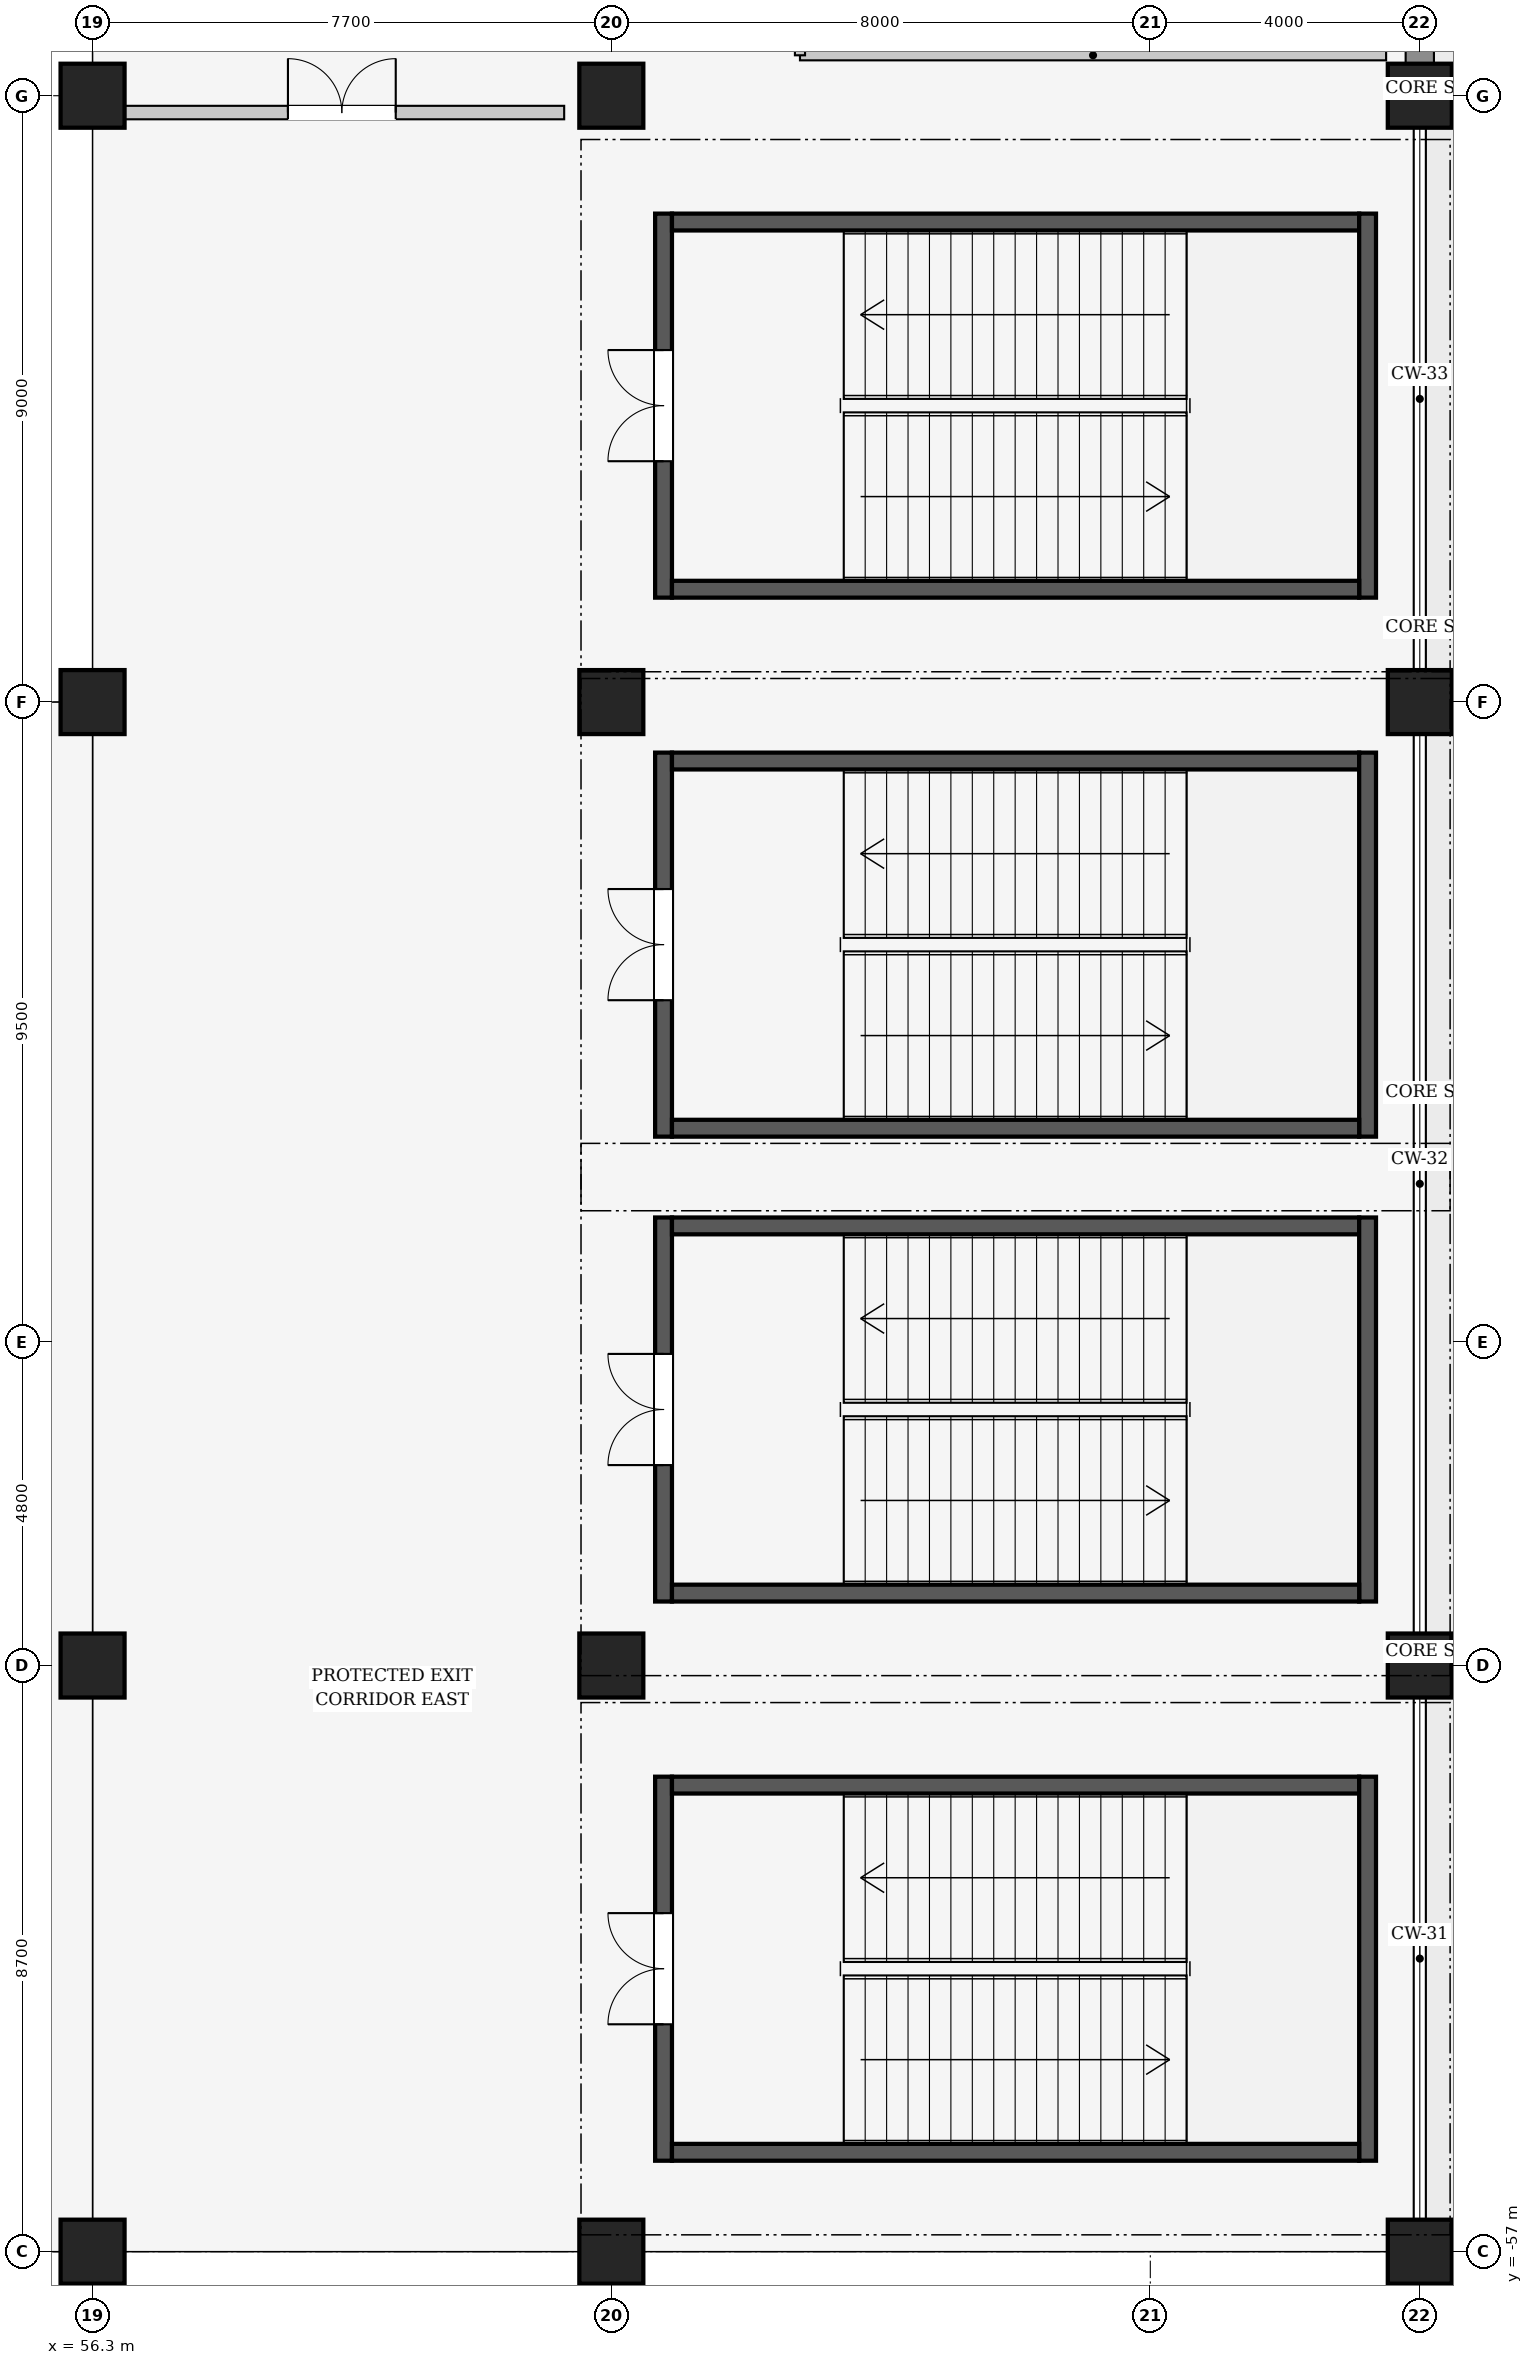
"""IFC4 building model, lengths in metres.
Left out: names, types, materials, properties, quantities, classifications, styles, units other than length and angle.
Written with IfcOpenShell. Run it as: python <this file> out.ifc"""

import sys

from ifc_helpers import new_model, si_unit, direction, frame, frame_2d, origin, origin_2d, place, context, subcontext, project, spatial, rectangle, extrude, element, fill, save


model = new_model("IFC4")
c1 = context("Model", 3, precision=1e-05, world=origin(), true_north=direction((0.0, 1.0)))
c2 = subcontext(c1, "Body", "Model", "MODEL_VIEW")
j1 = project(units=[si_unit("LENGTHUNIT", "METRE"), si_unit("PLANEANGLEUNIT", "RADIAN")], contexts=[c1])
p1 = place(None, origin())
s1 = spatial("IfcSite", under=j1, at=p1, CompositionType="ELEMENT")
p2 = place(p1, origin())
s2 = spatial("IfcBuilding", under=s1, at=p2, CompositionType="ELEMENT")
p3 = place(p2, origin())
s3 = spatial("IfcBuildingStorey", under=s2, at=p3, CompositionType="ELEMENT", Elevation=0.0)
for number, where, z_axis, x_axis in (
    (1, (56.3, -57.0, 0.0), (0.0, 0.0, 1.0), (1.0, 0.0, 0.0)),
    (2, (56.3, -48.3, 0.0), (0.0, 0.0, 1.0), (1.0, 0.0, 0.0)),
    (3, (56.3, -34.0, 0.0), (0.0, 0.0, 1.0), (1.0, 0.0, 0.0)),
    (4, (56.3, -25.0, 0.0), (0.0, 0.0, 1.0), (1.0, 0.0, 0.0)),
    (5, (64.0, -57.0, 0.0), (0.0, 0.0, 1.0), (1.0, 0.0, 0.0)),
    (6, (64.0, -48.3, 0.0), (0.0, 0.0, 1.0), (1.0, 0.0, 0.0)),
    (7, (64.0, -34.0, 0.0), (0.0, 0.0, 1.0), (1.0, 0.0, 0.0)),
    (8, (64.0, -25.0, 0.0), (0.0, 0.0, 1.0), (1.0, 0.0, 0.0)),
    (9, (76.0, -57.0, 0.0), (0.0, 0.0, 1.0), (1.0, 0.0, 0.0)),
    (10, (76.0, -48.3, 0.0), (0.0, 0.0, 1.0), (1.0, 0.0, 0.0)),
    (11, (76.0, -34.0, 0.0), (0.0, 0.0, 1.0), (1.0, 0.0, 0.0)),
    (12, (76.0, -25.0, 0.0), (0.0, 0.0, 1.0), (1.0, 0.0, 0.0)),
):
    element("IfcColumn", number, at=place(p3, frame(where, z_axis=z_axis, x_axis=x_axis)), inside=s3, PredefinedType="COLUMN", context=c2, shape_type="SweptSolid", body=[
        extrude(rectangle(XDim=0.95, YDim=0.95, at=origin_2d()), origin(), (0.0, 0.0, 1.0), 6.0),
    ])
p4 = place(p3, frame((76.0, -17.457, 0.0), z_axis=(0.0, 0.0, 1.0), x_axis=(0.0, -1.0, 0.0)))
e13 = element("IfcWall", 13, at=p4, inside=s3, PredefinedType="SOLIDWALL", context=c2, shape_type="SweptSolid", body=[
    extrude(rectangle(XDim=7.086, YDim=0.42, at=frame_2d((3.543, 0.0))), origin(), (0.0, 0.0, 1.0), 4.74),
])
p5 = place(p4, frame((2.343, 0.0, 0.0)))
e14 = element("IfcOpeningElement", 14, at=p5, cuts=e13, PredefinedType="OPENING", context=c2, shape_type="SweptSolid", body=[
    extrude(rectangle(XDim=2.4, YDim=3.0, at=frame_2d((1.2, 1.5))), frame((0.0, 0.22, 0.0), z_axis=(0.0, -1.0, 0.0), x_axis=(1.0, 0.0, 0.0)), (0.0, 0.0, 1.0), 0.44),
])
p6 = place(p3, frame((64.775, -55.65, 0.0), z_axis=(0.0, 0.0, 1.0), x_axis=(0.0, 1.0, 0.0)))
e15 = element("IfcWall", 15, at=p6, inside=s3, PredefinedType="SHEAR", context=c2, shape_type="SweptSolid", body=[
    extrude(rectangle(XDim=5.7, YDim=0.25, at=frame_2d((2.85, 0.0))), origin(), (0.0, 0.0, 1.0), 6.0),
])
p7 = place(p6, frame((2.025, 0.0, 0.0)))
e16 = element("IfcOpeningElement", 16, at=p7, cuts=e15, PredefinedType="OPENING", context=c2, shape_type="SweptSolid", body=[
    extrude(rectangle(XDim=1.65, YDim=2.2, at=frame_2d((0.825, 1.1))), frame((0.0, 0.135, 0.0), z_axis=(0.0, -1.0, 0.0), x_axis=(1.0, 0.0, 0.0)), (0.0, 0.0, 1.0), 0.27),
])
p8 = place(p3, frame((64.9, -50.075, 0.0), z_axis=(0.0, 0.0, 1.0), x_axis=(1.0, 0.0, 0.0)))
e17 = element("IfcWall", 17, at=p8, inside=s3, PredefinedType="SHEAR", context=c2, shape_type="SweptSolid", body=[
    extrude(rectangle(XDim=10.2, YDim=0.25, at=frame_2d((5.1, 0.0))), origin(), (0.0, 0.0, 1.0), 6.0),
])
p9 = place(p3, frame((75.225, -49.95, 0.0), z_axis=(0.0, 0.0, 1.0), x_axis=(0.0, -1.0, 0.0)))
e18 = element("IfcWall", 18, at=p9, inside=s3, PredefinedType="SHEAR", context=c2, shape_type="SweptSolid", body=[
    extrude(rectangle(XDim=5.7, YDim=0.25, at=frame_2d((2.85, 0.0))), origin(), (0.0, 0.0, 1.0), 6.0),
])
p10 = place(p3, frame((75.1, -55.525, 0.0), z_axis=(0.0, 0.0, 1.0), x_axis=(-1.0, 0.0, 0.0)))
e19 = element("IfcWall", 19, at=p10, inside=s3, PredefinedType="SHEAR", context=c2, shape_type="SweptSolid", body=[
    extrude(rectangle(XDim=10.2, YDim=0.25, at=frame_2d((5.1, 0.0))), origin(), (0.0, 0.0, 1.0), 6.0),
])
p11 = place(p3, frame((64.775, -47.35, 0.0), z_axis=(0.0, 0.0, 1.0), x_axis=(0.0, 1.0, 0.0)))
e20 = element("IfcWall", 20, at=p11, inside=s3, PredefinedType="SHEAR", context=c2, shape_type="SweptSolid", body=[
    extrude(rectangle(XDim=5.7, YDim=0.25, at=frame_2d((2.85, 0.0))), origin(), (0.0, 0.0, 1.0), 6.0),
])
p12 = place(p11, frame((2.025, 0.0, 0.0)))
e21 = element("IfcOpeningElement", 21, at=p12, cuts=e20, PredefinedType="OPENING", context=c2, shape_type="SweptSolid", body=[
    extrude(rectangle(XDim=1.65, YDim=2.2, at=frame_2d((0.825, 1.1))), frame((0.0, 0.135, 0.0), z_axis=(0.0, -1.0, 0.0), x_axis=(1.0, 0.0, 0.0)), (0.0, 0.0, 1.0), 0.27),
])
p13 = place(p3, frame((64.9, -41.775, 0.0), z_axis=(0.0, 0.0, 1.0), x_axis=(1.0, 0.0, 0.0)))
e22 = element("IfcWall", 22, at=p13, inside=s3, PredefinedType="SHEAR", context=c2, shape_type="SweptSolid", body=[
    extrude(rectangle(XDim=10.2, YDim=0.25, at=frame_2d((5.1, 0.0))), origin(), (0.0, 0.0, 1.0), 6.0),
])
p14 = place(p3, frame((75.225, -41.65, 0.0), z_axis=(0.0, 0.0, 1.0), x_axis=(0.0, -1.0, 0.0)))
e23 = element("IfcWall", 23, at=p14, inside=s3, PredefinedType="SHEAR", context=c2, shape_type="SweptSolid", body=[
    extrude(rectangle(XDim=5.7, YDim=0.25, at=frame_2d((2.85, 0.0))), origin(), (0.0, 0.0, 1.0), 6.0),
])
p15 = place(p3, frame((75.1, -47.225, 0.0), z_axis=(0.0, 0.0, 1.0), x_axis=(-1.0, 0.0, 0.0)))
e24 = element("IfcWall", 24, at=p15, inside=s3, PredefinedType="SHEAR", context=c2, shape_type="SweptSolid", body=[
    extrude(rectangle(XDim=10.2, YDim=0.25, at=frame_2d((5.1, 0.0))), origin(), (0.0, 0.0, 1.0), 6.0),
])
p16 = place(p3, frame((64.775, -40.45, 0.0), z_axis=(0.0, 0.0, 1.0), x_axis=(0.0, 1.0, 0.0)))
e25 = element("IfcWall", 25, at=p16, inside=s3, PredefinedType="SHEAR", context=c2, shape_type="SweptSolid", body=[
    extrude(rectangle(XDim=5.7, YDim=0.25, at=frame_2d((2.85, 0.0))), origin(), (0.0, 0.0, 1.0), 6.0),
])
p17 = place(p16, frame((2.025, 0.0, 0.0)))
e26 = element("IfcOpeningElement", 26, at=p17, cuts=e25, PredefinedType="OPENING", context=c2, shape_type="SweptSolid", body=[
    extrude(rectangle(XDim=1.65, YDim=2.2, at=frame_2d((0.825, 1.1))), frame((0.0, 0.135, 0.0), z_axis=(0.0, -1.0, 0.0), x_axis=(1.0, 0.0, 0.0)), (0.0, 0.0, 1.0), 0.27),
])
p18 = place(p3, frame((64.9, -34.875, 0.0), z_axis=(0.0, 0.0, 1.0), x_axis=(1.0, 0.0, 0.0)))
e27 = element("IfcWall", 27, at=p18, inside=s3, PredefinedType="SHEAR", context=c2, shape_type="SweptSolid", body=[
    extrude(rectangle(XDim=10.2, YDim=0.25, at=frame_2d((5.1, 0.0))), origin(), (0.0, 0.0, 1.0), 6.0),
])
p19 = place(p3, frame((75.225, -34.75, 0.0), z_axis=(0.0, 0.0, 1.0), x_axis=(0.0, -1.0, 0.0)))
e28 = element("IfcWall", 28, at=p19, inside=s3, PredefinedType="SHEAR", context=c2, shape_type="SweptSolid", body=[
    extrude(rectangle(XDim=5.7, YDim=0.25, at=frame_2d((2.85, 0.0))), origin(), (0.0, 0.0, 1.0), 6.0),
])
p20 = place(p3, frame((75.1, -40.325, 0.0), z_axis=(0.0, 0.0, 1.0), x_axis=(-1.0, 0.0, 0.0)))
e29 = element("IfcWall", 29, at=p20, inside=s3, PredefinedType="SHEAR", context=c2, shape_type="SweptSolid", body=[
    extrude(rectangle(XDim=10.2, YDim=0.25, at=frame_2d((5.1, 0.0))), origin(), (0.0, 0.0, 1.0), 6.0),
])
p21 = place(p3, frame((64.775, -32.45, 0.0), z_axis=(0.0, 0.0, 1.0), x_axis=(0.0, 1.0, 0.0)))
e30 = element("IfcWall", 30, at=p21, inside=s3, PredefinedType="SHEAR", context=c2, shape_type="SweptSolid", body=[
    extrude(rectangle(XDim=5.7, YDim=0.25, at=frame_2d((2.85, 0.0))), origin(), (0.0, 0.0, 1.0), 6.0),
])
p22 = place(p21, frame((2.025, 0.0, 0.0)))
e31 = element("IfcOpeningElement", 31, at=p22, cuts=e30, PredefinedType="OPENING", context=c2, shape_type="SweptSolid", body=[
    extrude(rectangle(XDim=1.65, YDim=2.2, at=frame_2d((0.825, 1.1))), frame((0.0, 0.135, 0.0), z_axis=(0.0, -1.0, 0.0), x_axis=(1.0, 0.0, 0.0)), (0.0, 0.0, 1.0), 0.27),
])
p23 = place(p3, frame((64.9, -26.875, 0.0), z_axis=(0.0, 0.0, 1.0), x_axis=(1.0, 0.0, 0.0)))
e32 = element("IfcWall", 32, at=p23, inside=s3, PredefinedType="SHEAR", context=c2, shape_type="SweptSolid", body=[
    extrude(rectangle(XDim=10.2, YDim=0.25, at=frame_2d((5.1, 0.0))), origin(), (0.0, 0.0, 1.0), 6.0),
])
p24 = place(p3, frame((75.225, -26.75, 0.0), z_axis=(0.0, 0.0, 1.0), x_axis=(0.0, -1.0, 0.0)))
e33 = element("IfcWall", 33, at=p24, inside=s3, PredefinedType="SHEAR", context=c2, shape_type="SweptSolid", body=[
    extrude(rectangle(XDim=5.7, YDim=0.25, at=frame_2d((2.85, 0.0))), origin(), (0.0, 0.0, 1.0), 6.0),
])
p25 = place(p3, frame((75.1, -32.325, 0.0), z_axis=(0.0, 0.0, 1.0), x_axis=(-1.0, 0.0, 0.0)))
e34 = element("IfcWall", 34, at=p25, inside=s3, PredefinedType="SHEAR", context=c2, shape_type="SweptSolid", body=[
    extrude(rectangle(XDim=10.2, YDim=0.25, at=frame_2d((5.1, 0.0))), origin(), (0.0, 0.0, 1.0), 6.0),
])
p26 = place(p3, frame((75.5, -24.4, 0.0), z_axis=(0.0, 0.0, 1.0), x_axis=(-1.0, 0.0, 0.0)))
e35 = element("IfcWall", 35, at=p26, inside=s3, PredefinedType="PARTITIONING", context=c2, shape_type="SweptSolid", body=[
    extrude(rectangle(XDim=8.7, YDim=0.15, at=frame_2d((4.35, 0.0))), origin(), (0.0, 0.0, 1.0), 5.64),
])
p27 = place(p3, frame((66.8, -24.4, 0.0), z_axis=(0.0, 0.0, 1.0), x_axis=(0.0, 1.0, 0.0)))
e36 = element("IfcWall", 36, at=p27, inside=s3, PredefinedType="PARTITIONING", context=c2, shape_type="SweptSolid", body=[
    extrude(rectangle(XDim=9.4, YDim=0.15, at=frame_2d((4.7, 0.0))), origin(), (0.0, 0.0, 1.0), 4.725),
])
p28 = place(p27, frame((3.8, 0.0, 0.0)))
e37 = element("IfcOpeningElement", 37, at=p28, cuts=e36, PredefinedType="OPENING", context=c2, shape_type="SweptSolid", body=[
    extrude(rectangle(XDim=1.8, YDim=2.2, at=frame_2d((0.9, 1.1))), frame((0.0, 0.085, 0.0), z_axis=(0.0, -1.0, 0.0), x_axis=(1.0, 0.0, 0.0)), (0.0, 0.0, 1.0), 0.17),
])
p29 = place(p3, frame((56.7, -25.25, 0.0), z_axis=(0.0, 0.0, 1.0), x_axis=(1.0, 0.0, 0.0)))
e38 = element("IfcWall", 38, at=p29, inside=s3, PredefinedType="PARTITIONING", context=c2, shape_type="SweptSolid", body=[
    extrude(rectangle(XDim=6.6, YDim=0.2, at=frame_2d((3.3, 0.0))), origin(), (0.0, 0.0, 1.0), 4.925),
])
p30 = place(p29, frame((2.5, 0.0, 0.0)))
e39 = element("IfcOpeningElement", 39, at=p30, cuts=e38, PredefinedType="OPENING", context=c2, shape_type="SweptSolid", body=[
    extrude(rectangle(XDim=1.6, YDim=2.2, at=frame_2d((0.8, 1.1))), frame((0.0, 0.11, 0.0), z_axis=(0.0, -1.0, 0.0), x_axis=(1.0, 0.0, 0.0)), (0.0, 0.0, 1.0), 0.22),
])
p31 = place(p7, origin())
e40 = element("IfcDoor", 40, at=p31, inside=s3, OperationType="DOUBLE_DOOR_SINGLE_SWING", PredefinedType="DOOR", context=c2, shape_type="SweptSolid", body=[
    extrude(rectangle(XDim=1.65, YDim=2.2, at=frame_2d((0.825, 1.1))), frame((0.0, 0.025, 0.0), z_axis=(0.0, -1.0, 0.0), x_axis=(1.0, 0.0, 0.0)), (0.0, 0.0, 1.0), 0.05),
])
fill(e16, e40)
p32 = place(p12, origin())
e41 = element("IfcDoor", 41, at=p32, inside=s3, OperationType="DOUBLE_DOOR_SINGLE_SWING", PredefinedType="DOOR", context=c2, shape_type="SweptSolid", body=[
    extrude(rectangle(XDim=1.65, YDim=2.2, at=frame_2d((0.825, 1.1))), frame((0.0, 0.025, 0.0), z_axis=(0.0, -1.0, 0.0), x_axis=(1.0, 0.0, 0.0)), (0.0, 0.0, 1.0), 0.05),
])
fill(e21, e41)
p33 = place(p17, origin())
e42 = element("IfcDoor", 42, at=p33, inside=s3, OperationType="DOUBLE_DOOR_SINGLE_SWING", PredefinedType="DOOR", context=c2, shape_type="SweptSolid", body=[
    extrude(rectangle(XDim=1.65, YDim=2.2, at=frame_2d((0.825, 1.1))), frame((0.0, 0.025, 0.0), z_axis=(0.0, -1.0, 0.0), x_axis=(1.0, 0.0, 0.0)), (0.0, 0.0, 1.0), 0.05),
])
fill(e26, e42)
p34 = place(p22, origin())
e43 = element("IfcDoor", 43, at=p34, inside=s3, OperationType="DOUBLE_DOOR_SINGLE_SWING", PredefinedType="DOOR", context=c2, shape_type="SweptSolid", body=[
    extrude(rectangle(XDim=1.65, YDim=2.2, at=frame_2d((0.825, 1.1))), frame((0.0, 0.025, 0.0), z_axis=(0.0, -1.0, 0.0), x_axis=(1.0, 0.0, 0.0)), (0.0, 0.0, 1.0), 0.05),
])
fill(e31, e43)
p35 = place(p30, origin())
e44 = element("IfcDoor", 44, at=p35, inside=s3, OperationType="DOUBLE_DOOR_SINGLE_SWING", PredefinedType="DOOR", context=c2, shape_type="SweptSolid", body=[
    extrude(rectangle(XDim=1.6, YDim=2.2, at=frame_2d((0.8, 1.1))), frame((0.0, 0.025, 0.0), z_axis=(0.0, -1.0, 0.0), x_axis=(1.0, 0.0, 0.0)), (0.0, 0.0, 1.0), 0.05),
])
fill(e39, e44)
save(model, sys.argv[1])
